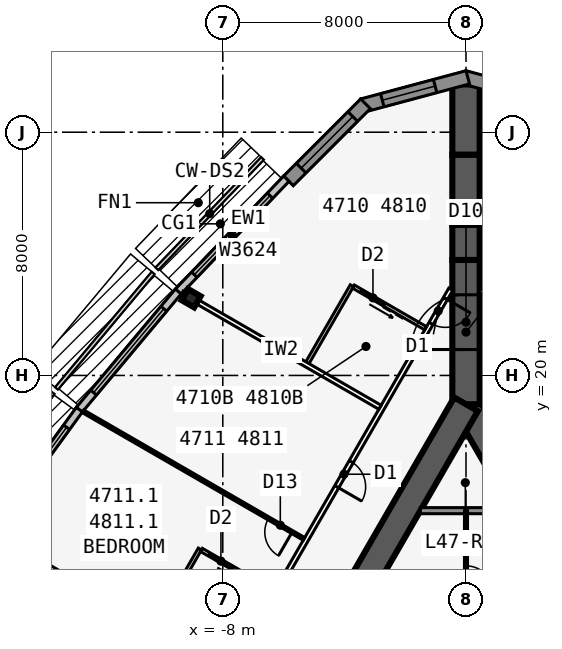
"""IFC4 building model, lengths in metres.
Left out: names, types, materials, properties, quantities, classifications, styles, units other than length and angle.
Written with IfcOpenShell. Run it as: python <this file> out.ifc"""

import sys

from ifc_helpers import new_model, si_unit, direction, frame, frame_2d, origin, origin_2d, place, context, subcontext, project, spatial, polyline, rectangle, i_section, outline, extrude, element, fill, save


model = new_model("IFC4")
c1 = context("Model", 3, precision=1e-05, world=origin(), true_north=direction((0.0, 1.0)))
c2 = subcontext(c1, "Body", "Model", "MODEL_VIEW")
j1 = project(units=[si_unit("LENGTHUNIT", "METRE"), si_unit("PLANEANGLEUNIT", "RADIAN")], contexts=[c1])
p1 = place(None, origin())
s1 = spatial("IfcSite", under=j1, at=p1, CompositionType="ELEMENT")
p2 = place(p1, origin())
s2 = spatial("IfcBuilding", under=s1, at=p2, CompositionType="ELEMENT")
p3 = place(p2, frame((0.0, 0.0, 175.9)))
s3 = spatial("IfcBuildingStorey", under=s2, at=p3, CompositionType="ELEMENT", Elevation=175.9)
p4 = place(p3, frame((16.5, -9.526, 0.0), z_axis=(0.0, 0.0, 1.0), x_axis=(-0.499999749417, 0.866025548458, 0.0)))
e1 = element("IfcWall", 1, at=p4, inside=s3, PredefinedType="SHEAR", context=c2, shape_type="SweptSolid", body=[
    extrude(rectangle(XDim=33.0, YDim=0.9, at=frame_2d((16.5, 0.0))), origin(), (0.0, 0.0, 1.0), 3.4),
])
p5 = place(p4, frame((14.15, 0.0, 0.0)))
e2 = element("IfcOpeningElement", 2, at=p5, cuts=e1, PredefinedType="OPENING", context=c2, shape_type="SweptSolid", body=[
    extrude(rectangle(XDim=1.8, YDim=2.13, at=frame_2d((0.9, 1.065))), frame((0.0, 0.46, 0.0), z_axis=(0.0, -1.0, 0.0), x_axis=(1.0, 0.0, 0.0)), (0.0, 0.0, 1.0), 0.92),
])
p6 = place(p4, frame((12.6, 0.0, 0.0)))
e3 = element("IfcOpeningElement", 3, at=p6, cuts=e1, PredefinedType="OPENING", context=c2, shape_type="SweptSolid", body=[
    extrude(rectangle(XDim=1.0, YDim=2.13, at=frame_2d((0.5, 1.065))), frame((0.0, 0.46, 0.0), z_axis=(0.0, -1.0, 0.0), x_axis=(1.0, 0.0, 0.0)), (0.0, 0.0, 1.0), 0.92),
])
p7 = place(p3, frame((0.0, 19.052, 0.0), z_axis=(0.0, 0.0, 1.0), x_axis=(-0.499999749417, -0.866025548458, 0.0)))
e4 = element("IfcWall", 4, at=p7, inside=s3, PredefinedType="SHEAR", context=c2, shape_type="SweptSolid", body=[
    extrude(rectangle(XDim=33.0, YDim=0.9, at=frame_2d((16.5, 0.0))), origin(), (0.0, 0.0, 1.0), 3.4),
])
p8 = place(p7, frame((14.15, 0.0, 0.0)))
e5 = element("IfcOpeningElement", 5, at=p8, cuts=e4, PredefinedType="OPENING", context=c2, shape_type="SweptSolid", body=[
    extrude(rectangle(XDim=1.8, YDim=2.13, at=frame_2d((0.9, 1.065))), frame((0.0, 0.46, 0.0), z_axis=(0.0, -1.0, 0.0), x_axis=(1.0, 0.0, 0.0)), (0.0, 0.0, 1.0), 0.92),
])
p9 = place(p7, frame((12.6, 0.0, 0.0)))
e6 = element("IfcOpeningElement", 6, at=p9, cuts=e4, PredefinedType="OPENING", context=c2, shape_type="SweptSolid", body=[
    extrude(rectangle(XDim=1.0, YDim=2.13, at=frame_2d((0.5, 1.065))), frame((0.0, 0.46, 0.0), z_axis=(0.0, -1.0, 0.0), x_axis=(1.0, 0.0, 0.0)), (0.0, 0.0, 1.0), 0.92),
])
p10 = place(p3, frame((0.0, 19.052, 0.0), z_axis=(0.0, 0.0, 1.0), x_axis=(0.0, 1.0, 0.0)))
e7 = element("IfcWall", 7, at=p10, inside=s3, PredefinedType="SHEAR", context=c2, shape_type="SweptSolid", body=[
    extrude(rectangle(XDim=4.746, YDim=0.9, at=frame_2d((2.373, 0.0))), origin(), (0.0, 0.0, 1.0), 3.4),
])
p11 = place(p10, frame((1.8, 0.0, 0.0)))
e8 = element("IfcOpeningElement", 8, at=p11, cuts=e7, PredefinedType="OPENING", context=c2, shape_type="SweptSolid", body=[
    extrude(rectangle(XDim=1.8, YDim=2.13, at=frame_2d((0.9, 1.065))), frame((0.0, 0.46, 0.0), z_axis=(0.0, -1.0, 0.0), x_axis=(1.0, 0.0, 0.0)), (0.0, 0.0, 1.0), 0.92),
])
p12 = place(p3, frame((0.0, 23.799, 0.0), z_axis=(0.0, 0.0, 1.0), x_axis=(0.0, 1.0, 0.0)))
e9 = element("IfcWall", 9, at=p12, inside=s3, PredefinedType="SHEAR", context=c2, shape_type="SweptSolid", body=[
    extrude(rectangle(XDim=1.155, YDim=0.9, at=frame_2d((0.577, 0.0))), origin(), (0.0, 0.0, 1.0), 3.4),
])
p13 = place(p3, frame((0.0, 24.953, 0.0), z_axis=(0.0, 0.0, 1.0), x_axis=(0.0, 1.0, 0.0)))
e10 = element("IfcWall", 10, at=p13, inside=s3, PredefinedType="SHEAR", context=c2, shape_type="SweptSolid", body=[
    extrude(rectangle(XDim=2.309, YDim=0.9, at=frame_2d((1.155, 0.0))), origin(), (0.0, 0.0, 1.0), 3.4),
])
p14 = place(p3, frame((0.0, 27.263, 0.0), z_axis=(0.0, 0.0, 1.0), x_axis=(0.0, 1.0, 0.0)))
e11 = element("IfcWall", 11, at=p14, inside=s3, PredefinedType="SHEAR", context=c2, shape_type="SweptSolid", body=[
    extrude(rectangle(XDim=2.31, YDim=0.9, at=frame_2d((1.155, 0.0))), origin(), (0.0, 0.0, 1.0), 3.4),
])
p15 = place(p3, frame((-9.041, 22.541, 0.0), z_axis=(0.0, 0.0, 1.0), x_axis=(-0.5, -0.866025403784, 0.0)))
e12 = element("IfcColumn", 12, at=p15, inside=s3, PredefinedType="COLUMN", context=c2, shape_type="SweptSolid", body=[
    extrude(i_section(OverallWidth=0.424, OverallDepth=0.475, WebThickness=0.048, FlangeThickness=0.077, at=origin_2d()), origin(), (0.0, 0.0, 1.0), 3.4),
])
p16 = place(p3, frame((3.406, 28.877, 0.0), z_axis=(0.0, 0.0, 1.0), x_axis=(-0.965924653531, 0.258823421857, 0.0)))
e13 = element("IfcWall", 13, at=p16, inside=s3, PredefinedType="SOLIDWALL", context=c2, shape_type="SweptSolid", body=[
    extrude(outline(polyline([(3.586, 0.225), (3.527, 0.225), (3.035, 0.093), (3.0, 0.225), (0.0, 0.225), (0.0, -0.225), (3.586, -0.225), (3.586, 0.225)])), origin(), (0.0, 0.0, 1.0), 3.235),
])
p17 = place(p16, frame((0.675, 0.0, 0.45)))
e14 = element("IfcOpeningElement", 14, at=p17, cuts=e13, PredefinedType="OPENING", context=c2, shape_type="SweptSolid", body=[
    extrude(rectangle(XDim=1.8, YDim=2.4, at=frame_2d((0.9, 1.2))), frame((0.0, 0.235, 0.0), z_axis=(0.0, -1.0, 0.0), x_axis=(1.0, 0.0, 0.0)), (0.0, 0.0, 1.0), 0.47),
])
p18 = place(p3, frame((0.058, 29.805, 0.0), z_axis=(0.0, 0.0, 1.0), x_axis=(-0.965924653531, -0.258823421857, 0.0)))
e15 = element("IfcWall", 15, at=p18, inside=s3, PredefinedType="SOLIDWALL", context=c2, shape_type="SweptSolid", body=[
    extrude(outline(polyline([(3.586, 0.225), (0.586, 0.225), (0.551, 0.093), (0.06, 0.225), (0.0, 0.225), (0.0, -0.225), (3.586, -0.225), (3.586, 0.225)])), origin(), (0.0, 0.0, 1.0), 3.235),
])
p19 = place(p18, frame((1.111, 0.0, 0.45)))
e16 = element("IfcOpeningElement", 16, at=p19, cuts=e15, PredefinedType="OPENING", context=c2, shape_type="SweptSolid", body=[
    extrude(rectangle(XDim=1.8, YDim=2.4, at=frame_2d((0.9, 1.2))), frame((0.0, 0.235, 0.0), z_axis=(0.0, -1.0, 0.0), x_axis=(1.0, 0.0, 0.0)), (0.0, 0.0, 1.0), 0.47),
])
p20 = place(p3, frame((-3.305, 28.935, 0.0), z_axis=(0.0, 0.0, 1.0), x_axis=(-0.707106781187, -0.707106781187, 0.0)))
e17 = element("IfcWall", 17, at=p20, inside=s3, PredefinedType="SOLIDWALL", context=c2, shape_type="SweptSolid", body=[
    extrude(rectangle(XDim=3.586, YDim=0.45, at=frame_2d((1.793, 0.0))), origin(), (0.0, 0.0, 1.0), 3.235),
])
p21 = place(p20, frame((0.593, 0.0, 0.45)))
e18 = element("IfcOpeningElement", 18, at=p21, cuts=e17, PredefinedType="OPENING", context=c2, shape_type="SweptSolid", body=[
    extrude(rectangle(XDim=2.4, YDim=2.4, at=frame_2d((1.2, 1.2))), frame((0.0, 0.235, 0.0), z_axis=(0.0, -1.0, 0.0), x_axis=(1.0, 0.0, 0.0)), (0.0, 0.0, 1.0), 0.47),
])
p22 = place(p3, frame((-5.91, 26.472, 0.0), z_axis=(0.0, 0.0, 1.0), x_axis=(-0.691719937936, -0.722165858693, 0.0)))
e19 = element("IfcWall", 19, at=p22, inside=s3, PredefinedType="STANDARD", context=c2, shape_type="SweptSolid", body=[
    extrude(rectangle(XDim=5.148, YDim=0.25, at=frame_2d((2.574, 0.0))), origin(), (0.0, 0.0, 1.0), 3.235),
])
p23 = place(p22, frame((0.774, 0.0, 0.45)))
e20 = element("IfcOpeningElement", 20, at=p23, cuts=e19, PredefinedType="OPENING", context=c2, shape_type="SweptSolid", body=[
    extrude(rectangle(XDim=3.6, YDim=2.4, at=frame_2d((1.8, 1.2))), frame((0.0, 0.135, 0.0), z_axis=(0.0, -1.0, 0.0), x_axis=(1.0, 0.0, 0.0)), (0.0, 0.0, 1.0), 0.27),
])
p24 = place(p3, frame((-9.465, 22.76, 0.0), z_axis=(0.0, 0.0, 1.0), x_axis=(-0.641810386606, -0.766863369607, 0.0)))
e21 = element("IfcWall", 21, at=p24, inside=s3, PredefinedType="STANDARD", context=c2, shape_type="SweptSolid", body=[
    extrude(rectangle(XDim=5.076, YDim=0.25, at=frame_2d((2.538, 0.0))), origin(), (0.0, 0.0, 1.0), 3.235),
])
p25 = place(p24, frame((0.738, 0.0, 0.45)))
e22 = element("IfcOpeningElement", 22, at=p25, cuts=e21, PredefinedType="OPENING", context=c2, shape_type="SweptSolid", body=[
    extrude(rectangle(XDim=3.6, YDim=2.4, at=frame_2d((1.8, 1.2))), frame((0.0, 0.135, 0.0), z_axis=(0.0, -1.0, 0.0), x_axis=(1.0, 0.0, 0.0)), (0.0, 0.0, 1.0), 0.27),
])
p26 = place(p3, frame((-12.718, 18.875, 0.0), z_axis=(0.0, 0.0, 1.0), x_axis=(-0.587669188412, -0.809101307001, 0.0)))
e23 = element("IfcWall", 23, at=p26, inside=s3, PredefinedType="STANDARD", context=c2, shape_type="SweptSolid", body=[
    extrude(rectangle(XDim=5.028, YDim=0.25, at=frame_2d((2.514, 0.0))), origin(), (0.0, 0.0, 1.0), 3.235),
])
p27 = place(p26, frame((0.714, 0.0, 0.45)))
e24 = element("IfcOpeningElement", 24, at=p27, cuts=e23, PredefinedType="OPENING", context=c2, shape_type="SweptSolid", body=[
    extrude(rectangle(XDim=3.6, YDim=2.4, at=frame_2d((1.8, 1.2))), frame((0.0, 0.135, 0.0), z_axis=(0.0, -1.0, 0.0), x_axis=(1.0, 0.0, 0.0)), (0.0, 0.0, 1.0), 0.27),
])
p28 = place(p3, frame((20.027, -10.985, 0.0), z_axis=(0.0, 0.0, 1.0), x_axis=(-0.500001677587, 0.866024435227, 0.0)))
e25 = element("IfcWall", 25, at=p28, inside=s3, PredefinedType="PARTITIONING", context=c2, shape_type="SweptSolid", body=[
    extrude(rectangle(XDim=39.054, YDim=0.15, at=frame_2d((19.527, 0.0))), origin(), (0.0, 0.0, 1.0), 3.235),
])
p29 = place(p28, frame((1.558, 0.0, 0.0)))
e26 = element("IfcOpeningElement", 26, at=p29, cuts=e25, PredefinedType="OPENING", context=c2, shape_type="SweptSolid", body=[
    extrude(rectangle(XDim=0.95, YDim=2.13, at=frame_2d((0.475, 1.065))), frame((0.0, 0.085, 0.0), z_axis=(0.0, -1.0, 0.0), x_axis=(1.0, 0.0, 0.0)), (0.0, 0.0, 1.0), 0.17),
])
p30 = place(p28, frame((11.552, 0.0, 0.0)))
e27 = element("IfcOpeningElement", 27, at=p30, cuts=e25, PredefinedType="OPENING", context=c2, shape_type="SweptSolid", body=[
    extrude(rectangle(XDim=0.95, YDim=2.13, at=frame_2d((0.475, 1.065))), frame((0.0, 0.085, 0.0), z_axis=(0.0, -1.0, 0.0), x_axis=(1.0, 0.0, 0.0)), (0.0, 0.0, 1.0), 0.17),
])
p31 = place(p28, frame((25.352, 0.0, 0.0)))
e28 = element("IfcOpeningElement", 28, at=p31, cuts=e25, PredefinedType="OPENING", context=c2, shape_type="SweptSolid", body=[
    extrude(rectangle(XDim=0.95, YDim=2.13, at=frame_2d((0.475, 1.065))), frame((0.0, 0.085, 0.0), z_axis=(0.0, -1.0, 0.0), x_axis=(1.0, 0.0, 0.0)), (0.0, 0.0, 1.0), 0.17),
])
p32 = place(p28, frame((36.546, 0.0, 0.0)))
e29 = element("IfcOpeningElement", 29, at=p32, cuts=e25, PredefinedType="OPENING", context=c2, shape_type="SweptSolid", body=[
    extrude(rectangle(XDim=0.95, YDim=2.13, at=frame_2d((0.475, 1.065))), frame((0.0, 0.085, 0.0), z_axis=(0.0, -1.0, 0.0), x_axis=(1.0, 0.0, 0.0)), (0.0, 0.0, 1.0), 0.17),
])
p33 = place(p3, frame((-0.5, 22.836, 0.0), z_axis=(0.0, 0.0, 1.0), x_axis=(-0.500001677587, -0.866024435227, 0.0)))
e30 = element("IfcWall", 30, at=p33, inside=s3, PredefinedType="PARTITIONING", context=c2, shape_type="SweptSolid", body=[
    extrude(rectangle(XDim=39.054, YDim=0.15, at=frame_2d((19.527, 0.0))), origin(), (0.0, 0.0, 1.0), 3.235),
])
p34 = place(p33, frame((0.352, 0.0, 0.0)))
e31 = element("IfcOpeningElement", 31, at=p34, cuts=e30, PredefinedType="OPENING", context=c2, shape_type="SweptSolid", body=[
    extrude(rectangle(XDim=0.95, YDim=2.13, at=frame_2d((0.475, 1.065))), frame((0.0, 0.085, 0.0), z_axis=(0.0, -1.0, 0.0), x_axis=(1.0, 0.0, 0.0)), (0.0, 0.0, 1.0), 0.17),
])
p35 = place(p33, frame((6.552, 0.0, 0.0)))
e32 = element("IfcOpeningElement", 32, at=p35, cuts=e30, PredefinedType="OPENING", context=c2, shape_type="SweptSolid", body=[
    extrude(rectangle(XDim=0.95, YDim=2.13, at=frame_2d((0.475, 1.065))), frame((0.0, 0.085, 0.0), z_axis=(0.0, -1.0, 0.0), x_axis=(1.0, 0.0, 0.0)), (0.0, 0.0, 1.0), 0.17),
])
p36 = place(p33, frame((15.952, 0.0, 0.0)))
e33 = element("IfcOpeningElement", 33, at=p36, cuts=e30, PredefinedType="OPENING", context=c2, shape_type="SweptSolid", body=[
    extrude(rectangle(XDim=0.95, YDim=2.13, at=frame_2d((0.475, 1.065))), frame((0.0, 0.085, 0.0), z_axis=(0.0, -1.0, 0.0), x_axis=(1.0, 0.0, 0.0)), (0.0, 0.0, 1.0), 0.17),
])
p37 = place(p33, frame((21.552, 0.0, 0.0)))
e34 = element("IfcOpeningElement", 34, at=p37, cuts=e30, PredefinedType="OPENING", context=c2, shape_type="SweptSolid", body=[
    extrude(rectangle(XDim=0.95, YDim=2.13, at=frame_2d((0.475, 1.065))), frame((0.0, 0.085, 0.0), z_axis=(0.0, -1.0, 0.0), x_axis=(1.0, 0.0, 0.0)), (0.0, 0.0, 1.0), 0.17),
])
p38 = place(p33, frame((30.952, 0.0, 0.0)))
e35 = element("IfcOpeningElement", 35, at=p38, cuts=e30, PredefinedType="OPENING", context=c2, shape_type="SweptSolid", body=[
    extrude(rectangle(XDim=0.95, YDim=2.13, at=frame_2d((0.475, 1.065))), frame((0.0, 0.085, 0.0), z_axis=(0.0, -1.0, 0.0), x_axis=(1.0, 0.0, 0.0)), (0.0, 0.0, 1.0), 0.17),
])
p39 = place(p33, frame((37.752, 0.0, 0.0)))
e36 = element("IfcOpeningElement", 36, at=p39, cuts=e30, PredefinedType="OPENING", context=c2, shape_type="SweptSolid", body=[
    extrude(rectangle(XDim=0.95, YDim=2.13, at=frame_2d((0.475, 1.065))), frame((0.0, 0.085, 0.0), z_axis=(0.0, -1.0, 0.0), x_axis=(1.0, 0.0, 0.0)), (0.0, 0.0, 1.0), 0.17),
])
p40 = place(p3, frame((-2.829, 18.954, 0.0), z_axis=(0.0, 0.0, 1.0), x_axis=(-0.866015739374, 0.500016738876, 0.0)))
e37 = element("IfcWall", 37, at=p40, inside=s3, PredefinedType="PARTITIONING", context=c2, shape_type="SweptSolid", body=[
    extrude(rectangle(XDim=7.516, YDim=0.15, at=frame_2d((3.758, 0.0))), origin(), (0.0, 0.0, 1.0), 2.389),
])
p41 = place(p3, frame((-5.329, 14.623, 0.0), z_axis=(0.0, 0.0, 1.0), x_axis=(-0.866011723728, 0.500023693804, 0.0)))
e38 = element("IfcWall", 38, at=p41, inside=s3, PredefinedType="PARTITIONING", context=c2, shape_type="SweptSolid", body=[
    extrude(rectangle(XDim=8.395, YDim=0.1, at=frame_2d((4.198, 0.0))), origin(), (0.0, 0.0, 1.0), 2.389),
])
p42 = place(p41, frame((0.45, 0.0, 0.0)))
e39 = element("IfcOpeningElement", 39, at=p42, cuts=e38, PredefinedType="OPENING", context=c2, shape_type="SweptSolid", body=[
    extrude(rectangle(XDim=0.9, YDim=2.13, at=frame_2d((0.45, 1.065))), frame((0.0, 0.06, 0.0), z_axis=(0.0, -1.0, 0.0), x_axis=(1.0, 0.0, 0.0)), (0.0, 0.0, 1.0), 0.12),
])
p43 = place(p3, frame((-7.829, 10.293, 0.0), z_axis=(0.0, 0.0, 1.0), x_axis=(-0.866027015393, 0.499997208602, 0.0)))
e40 = element("IfcWall", 40, at=p43, inside=s3, PredefinedType="PARTITIONING", context=c2, shape_type="SweptSolid", body=[
    extrude(rectangle(XDim=8.922, YDim=0.15, at=frame_2d((4.461, 0.0))), origin(), (0.0, 0.0, 1.0), 2.389),
])
p44 = place(p3, frame((-3.753, 22.952, 0.0), z_axis=(0.0, 0.0, 1.0), x_axis=(-0.499990139034, -0.866031096941, 0.0)))
e41 = element("IfcWall", 41, at=p44, inside=s3, PredefinedType="PLUMBINGWALL", context=c2, shape_type="SweptSolid", body=[
    extrude(rectangle(XDim=3.0, YDim=0.12, at=frame_2d((1.5, 0.0))), origin(), (0.0, 0.0, 1.0), 3.235),
])
p45 = place(p3, frame((-1.329, 21.552, 0.0), z_axis=(0.0, 0.0, 1.0), x_axis=(-0.865997131366, 0.500048966069, 0.0)))
e42 = element("IfcWall", 42, at=p45, inside=s3, PredefinedType="PLUMBINGWALL", context=c2, shape_type="SweptSolid", body=[
    extrude(rectangle(XDim=2.74, YDim=0.12, at=frame_2d((1.37, 0.0))), origin(), (0.0, 0.0, 1.0), 3.235),
])
p46 = place(p45, frame((1.55, 0.0, 0.0)))
e43 = element("IfcOpeningElement", 43, at=p46, cuts=e42, PredefinedType="OPENING", context=c2, shape_type="SweptSolid", body=[
    extrude(rectangle(XDim=0.9, YDim=2.13, at=frame_2d((0.45, 1.065))), frame((0.0, 0.07, 0.0), z_axis=(0.0, -1.0, 0.0), x_axis=(1.0, 0.0, 0.0)), (0.0, 0.0, 1.0), 0.14),
])
p47 = place(p3, frame((-8.753, 14.291, 0.0), z_axis=(0.0, 0.0, 1.0), x_axis=(-0.50002537861, -0.866010750942, 0.0)))
e44 = element("IfcWall", 44, at=p47, inside=s3, PredefinedType="PLUMBINGWALL", context=c2, shape_type="SweptSolid", body=[
    extrude(rectangle(XDim=3.0, YDim=0.12, at=frame_2d((1.5, 0.0))), origin(), (0.0, 0.0, 1.0), 3.235),
])
p48 = place(p3, frame((-6.329, 12.891, 0.0), z_axis=(0.0, 0.0, 1.0), x_axis=(-0.866035715982, 0.499982138324, 0.0)))
e45 = element("IfcWall", 45, at=p48, inside=s3, PredefinedType="PLUMBINGWALL", context=c2, shape_type="SweptSolid", body=[
    extrude(rectangle(XDim=2.74, YDim=0.12, at=frame_2d((1.37, 0.0))), origin(), (0.0, 0.0, 1.0), 3.235),
])
p49 = place(p48, frame((1.55, 0.0, 0.0)))
e46 = element("IfcOpeningElement", 46, at=p49, cuts=e45, PredefinedType="OPENING", context=c2, shape_type="SweptSolid", body=[
    extrude(rectangle(XDim=0.9, YDim=2.13, at=frame_2d((0.45, 1.065))), frame((0.0, 0.07, 0.0), z_axis=(0.0, -1.0, 0.0), x_axis=(1.0, 0.0, 0.0)), (0.0, 0.0, 1.0), 0.14),
])
p50 = place(p3, frame((-1.501, 15.552, 0.0), z_axis=(0.0, 0.0, 1.0), x_axis=(1.0, 0.0, 0.0)))
e47 = element("IfcWall", 47, at=p50, inside=s3, PredefinedType="SOLIDWALL", context=c2, shape_type="SweptSolid", body=[
    extrude(rectangle(XDim=3.002, YDim=0.2, at=frame_2d((1.501, 0.0))), origin(), (0.0, 0.0, 1.0), 3.235),
])
p51 = place(p3, frame((0.0, 15.552, 0.0), z_axis=(0.0, 0.0, 1.0), x_axis=(0.0, -1.0, 0.0)))
e48 = element("IfcWall", 48, at=p51, inside=s3, PredefinedType="PARTITIONING", context=c2, shape_type="SweptSolid", body=[
    extrude(rectangle(XDim=3.775, YDim=0.1, at=frame_2d((1.888, 0.0))), origin(), (0.0, 0.0, 1.0), 3.235),
])
p52 = place(p51, frame((1.815, 0.0, 0.0)))
e49 = element("IfcOpeningElement", 49, at=p52, cuts=e48, PredefinedType="OPENING", context=c2, shape_type="SweptSolid", body=[
    extrude(rectangle(XDim=0.9, YDim=2.13, at=frame_2d((0.45, 1.065))), frame((0.0, 0.06, 0.0), z_axis=(0.0, -1.0, 0.0), x_axis=(1.0, 0.0, 0.0)), (0.0, 0.0, 1.0), 0.12),
])
p53 = place(p19, origin())
e50 = element("IfcWindow", 50, at=p53, inside=s3, PartitioningType="SINGLE_PANEL", PredefinedType="WINDOW", context=c2, shape_type="SweptSolid", body=[
    extrude(rectangle(XDim=1.8, YDim=2.4, at=frame_2d((0.9, 1.2))), frame((0.0, 0.03, 0.0), z_axis=(0.0, -1.0, 0.0), x_axis=(1.0, 0.0, 0.0)), (0.0, 0.0, 1.0), 0.06),
])
fill(e16, e50)
p54 = place(p21, origin())
e51 = element("IfcWindow", 51, at=p54, inside=s3, PartitioningType="SINGLE_PANEL", PredefinedType="WINDOW", context=c2, shape_type="SweptSolid", body=[
    extrude(rectangle(XDim=2.4, YDim=2.4, at=frame_2d((1.2, 1.2))), frame((0.0, 0.03, 0.0), z_axis=(0.0, -1.0, 0.0), x_axis=(1.0, 0.0, 0.0)), (0.0, 0.0, 1.0), 0.06),
])
fill(e18, e51)
p55 = place(p23, origin())
e52 = element("IfcWindow", 52, at=p55, inside=s3, PartitioningType="SINGLE_PANEL", PredefinedType="WINDOW", context=c2, shape_type="SweptSolid", body=[
    extrude(rectangle(XDim=3.6, YDim=2.4, at=frame_2d((1.8, 1.2))), frame((0.0, 0.03, 0.0), z_axis=(0.0, -1.0, 0.0), x_axis=(1.0, 0.0, 0.0)), (0.0, 0.0, 1.0), 0.06),
])
fill(e20, e52)
p56 = place(p25, origin())
e53 = element("IfcWindow", 53, at=p56, inside=s3, PartitioningType="SINGLE_PANEL", PredefinedType="WINDOW", context=c2, shape_type="SweptSolid", body=[
    extrude(rectangle(XDim=3.6, YDim=2.4, at=frame_2d((1.8, 1.2))), frame((0.0, 0.03, 0.0), z_axis=(0.0, -1.0, 0.0), x_axis=(1.0, 0.0, 0.0)), (0.0, 0.0, 1.0), 0.06),
])
fill(e22, e53)
p57 = place(p27, origin())
e54 = element("IfcWindow", 54, at=p57, inside=s3, PartitioningType="SINGLE_PANEL", PredefinedType="WINDOW", context=c2, shape_type="SweptSolid", body=[
    extrude(rectangle(XDim=3.6, YDim=2.4, at=frame_2d((1.8, 1.2))), frame((0.0, 0.03, 0.0), z_axis=(0.0, -1.0, 0.0), x_axis=(1.0, 0.0, 0.0)), (0.0, 0.0, 1.0), 0.06),
])
fill(e24, e54)
p58 = place(p42, origin())
e55 = element("IfcDoor", 55, at=p58, inside=s3, OperationType="SINGLE_SWING_LEFT", PredefinedType="DOOR", context=c2, shape_type="SweptSolid", body=[
    extrude(rectangle(XDim=0.9, YDim=2.13, at=frame_2d((0.45, 1.065))), frame((0.0, 0.025, 0.0), z_axis=(0.0, -1.0, 0.0), x_axis=(1.0, 0.0, 0.0)), (0.0, 0.0, 1.0), 0.05),
])
fill(e39, e55)
p59 = place(p46, origin())
e56 = element("IfcDoor", 56, at=p59, inside=s3, OperationType="SLIDING_TO_LEFT", PredefinedType="DOOR", context=c2, shape_type="SweptSolid", body=[
    extrude(rectangle(XDim=0.9, YDim=2.13, at=frame_2d((0.45, 1.065))), frame((0.0, 0.025, 0.0), z_axis=(0.0, -1.0, 0.0), x_axis=(1.0, 0.0, 0.0)), (0.0, 0.0, 1.0), 0.05),
])
fill(e43, e56)
p60 = place(p34, origin())
e57 = element("IfcDoor", 57, at=p60, inside=s3, OperationType="SINGLE_SWING_LEFT", PredefinedType="DOOR", context=c2, shape_type="SweptSolid", body=[
    extrude(rectangle(XDim=0.95, YDim=2.13, at=frame_2d((0.475, 1.065))), frame((0.0, 0.025, 0.0), z_axis=(0.0, -1.0, 0.0), x_axis=(1.0, 0.0, 0.0)), (0.0, 0.0, 1.0), 0.05),
])
fill(e31, e57)
p61 = place(p35, origin())
e58 = element("IfcDoor", 58, at=p61, inside=s3, OperationType="SINGLE_SWING_RIGHT", PredefinedType="DOOR", context=c2, shape_type="SweptSolid", body=[
    extrude(rectangle(XDim=0.95, YDim=2.13, at=frame_2d((0.475, 1.065))), frame((0.0, 0.025, 0.0), z_axis=(0.0, -1.0, 0.0), x_axis=(1.0, 0.0, 0.0)), (0.0, 0.0, 1.0), 0.05),
])
fill(e32, e58)
p62 = place(p49, origin())
e59 = element("IfcDoor", 59, at=p62, inside=s3, OperationType="SLIDING_TO_LEFT", PredefinedType="DOOR", context=c2, shape_type="SweptSolid", body=[
    extrude(rectangle(XDim=0.9, YDim=2.13, at=frame_2d((0.45, 1.065))), frame((0.0, 0.025, 0.0), z_axis=(0.0, -1.0, 0.0), x_axis=(1.0, 0.0, 0.0)), (0.0, 0.0, 1.0), 0.05),
])
fill(e46, e59)
p63 = place(p11, origin())
e60 = element("IfcDoor", 60, at=p63, inside=s3, OperationType="DOUBLE_DOOR_DOUBLE_SWING", PredefinedType="DOOR", context=c2, shape_type="SweptSolid", body=[
    extrude(rectangle(XDim=1.8, YDim=2.13, at=frame_2d((0.9, 1.065))), frame((0.0, 0.025, 0.0), z_axis=(0.0, -1.0, 0.0), x_axis=(1.0, 0.0, 0.0)), (0.0, 0.0, 1.0), 0.05),
])
fill(e8, e60)
p64 = place(p52, origin())
e61 = element("IfcDoor", 61, at=p64, inside=s3, OperationType="SINGLE_SWING_RIGHT", PredefinedType="DOOR", context=c2, shape_type="SweptSolid", body=[
    extrude(rectangle(XDim=0.9, YDim=2.13, at=frame_2d((0.45, 1.065))), frame((0.0, 0.025, 0.0), z_axis=(0.0, -1.0, 0.0), x_axis=(1.0, 0.0, 0.0)), (0.0, 0.0, 1.0), 0.05),
])
fill(e49, e61)
save(model, sys.argv[1])
